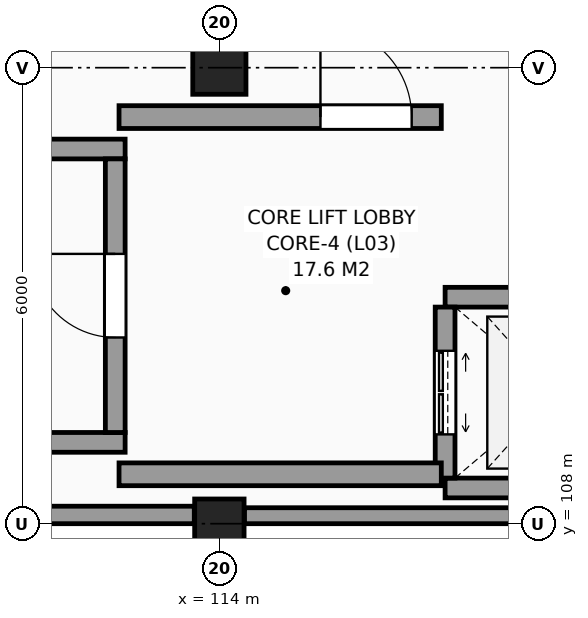
"""IFC4 building model, lengths in metres.
Left out: names, types, materials, properties, quantities, classifications, styles, units other than length and angle.
Written with IfcOpenShell. Run it as: python <this file> out.ifc"""

import sys

from ifc_helpers import new_model, si_unit, direction, frame, frame_2d, origin, origin_2d, place, context, subcontext, project, spatial, rectangle, circle, extrude, element, fill, save


model = new_model("IFC4")
c1 = context("Model", 3, precision=1e-05, world=origin(), true_north=direction((0.0, 1.0)))
c2 = subcontext(c1, "Body", "Model", "MODEL_VIEW")
j1 = project(units=[si_unit("LENGTHUNIT", "METRE"), si_unit("PLANEANGLEUNIT", "RADIAN")], contexts=[c1])
p1 = place(None, origin())
s1 = spatial("IfcSite", under=j1, at=p1, CompositionType="ELEMENT")
p2 = place(p1, origin())
s2 = spatial("IfcBuilding", under=s1, at=p2, CompositionType="ELEMENT")
p3 = place(p2, frame((0.0, 0.0, 15.0)))
s3 = spatial("IfcBuildingStorey", under=s2, at=p3, CompositionType="ELEMENT", Elevation=15.0)
p4 = place(p3, frame((114.0, 108.0, 0.0), z_axis=(0.0, 0.0, 1.0), x_axis=(1.0, 0.0, 0.0)))
e1 = element("IfcColumn", 1, at=p4, inside=s3, PredefinedType="COLUMN", context=c2, shape_type="SweptSolid", body=[
    extrude(rectangle(XDim=0.65, YDim=0.65, at=origin_2d()), origin(), (0.0, 0.0, 1.0), 4.8),
])
p5 = place(p3, frame((114.0, 114.0, 0.0), z_axis=(0.0, 0.0, 1.0), x_axis=(1.0, 0.0, 0.0)))
e2 = element("IfcColumn", 2, at=p5, inside=s3, PredefinedType="COLUMN", context=c2, shape_type="SweptSolid", body=[
    extrude(circle(Radius=0.35, at=origin_2d()), origin(), (0.0, 0.0, 1.0), 4.8),
])
p6 = place(p3, frame((108.355, 108.115, 0.0), z_axis=(0.0, 0.0, 1.0), x_axis=(1.0, 0.0, 0.0)))
e3 = element("IfcWall", 3, at=p6, inside=s3, PredefinedType="SOLIDWALL", context=c2, shape_type="SweptSolid", body=[
    extrude(rectangle(XDim=5.315, YDim=0.23, at=frame_2d((2.657, 0.0))), origin(), (0.0, 0.0, 1.0), 3.7),
])
p7 = place(p3, frame((114.33, 108.105, 0.0), z_axis=(0.0, 0.0, 1.0), x_axis=(1.0, 0.0, 0.0)))
e4 = element("IfcWall", 4, at=p7, inside=s3, PredefinedType="SOLIDWALL", context=c2, shape_type="SweptSolid", body=[
    extrude(rectangle(XDim=5.315, YDim=0.21, at=frame_2d((2.657, 0.0))), origin(), (0.0, 0.0, 1.0), 3.7),
])
for number, where, z_axis, x_axis in (
    (5, (102.04, 109.07, 0.0), (0.0, 0.0, 1.0), (1.0, 0.0, 0.0)),
    (6, (102.04, 112.93, 0.0), (0.0, 0.0, 1.0), (1.0, 0.0, 0.0)),
):
    element("IfcWall", number, at=place(p3, frame(where, z_axis=z_axis, x_axis=x_axis)), inside=s3, PredefinedType="SHEAR", context=c2, shape_type="SweptSolid", body=[
        extrude(rectangle(XDim=10.72, YDim=0.26, at=frame_2d((5.36, 0.0))), origin(), (0.0, 0.0, 1.0), 4.8),
    ])
p8 = place(p3, frame((112.63, 109.2, 0.0), z_axis=(0.0, 0.0, 1.0), x_axis=(0.0, 1.0, 0.0)))
e7 = element("IfcWall", 7, at=p8, inside=s3, PredefinedType="SHEAR", context=c2, shape_type="SweptSolid", body=[
    extrude(rectangle(XDim=3.6, YDim=0.26, at=frame_2d((1.8, 0.0))), origin(), (0.0, 0.0, 1.0), 4.8),
])
p9 = place(p8, frame((1.25, 0.0, 0.0)))
e8 = element("IfcOpeningElement", 8, at=p9, cuts=e7, PredefinedType="OPENING", context=c2, shape_type="SweptSolid", body=[
    extrude(rectangle(XDim=1.1, YDim=2.15, at=frame_2d((0.55, 1.075))), frame((0.0, 0.14, 0.0), z_axis=(0.0, -1.0, 0.0), x_axis=(1.0, 0.0, 0.0)), (0.0, 0.0, 1.0), 0.28),
])
for number, where, z_axis, x_axis in (
    (9, (116.97, 108.47, 0.0), (0.0, 0.0, 1.0), (1.0, 0.0, 0.0)),
    (10, (116.97, 110.98, 0.0), (0.0, 0.0, 1.0), (1.0, 0.0, 0.0)),
):
    element("IfcWall", number, at=place(p3, frame(where, z_axis=z_axis, x_axis=x_axis)), inside=s3, PredefinedType="SHEAR", context=c2, shape_type="SweptSolid", body=[
        extrude(rectangle(XDim=2.91, YDim=0.26, at=frame_2d((1.455, 0.0))), origin(), (0.0, 0.0, 1.0), 4.8),
    ])
p10 = place(p3, frame((116.97, 108.6, 0.0), z_axis=(0.0, 0.0, 1.0), x_axis=(0.0, 1.0, 0.0)))
e11 = element("IfcWall", 11, at=p10, inside=s3, PredefinedType="SHEAR", context=c2, shape_type="SweptSolid", body=[
    extrude(rectangle(XDim=2.25, YDim=0.26, at=frame_2d((1.125, 0.0))), origin(), (0.0, 0.0, 1.0), 4.8),
])
p11 = place(p10, frame((0.575, 0.0, 0.0)))
e12 = element("IfcOpeningElement", 12, at=p11, cuts=e11, PredefinedType="OPENING", context=c2, shape_type="SweptSolid", body=[
    extrude(rectangle(XDim=1.1, YDim=2.2, at=frame_2d((0.55, 1.1))), frame((0.0, 0.14, 0.0), z_axis=(0.0, -1.0, 0.0), x_axis=(1.0, 0.0, 0.0)), (0.0, 0.0, 1.0), 0.28),
])
p12 = place(p3, frame((112.68, 113.35, 0.0), z_axis=(0.0, 0.0, 1.0), x_axis=(1.0, 0.0, 0.0)))
e13 = element("IfcWall", 13, at=p12, inside=s3, PredefinedType="SHEAR", context=c2, shape_type="SweptSolid", body=[
    extrude(rectangle(XDim=4.24, YDim=0.3, at=frame_2d((2.12, 0.0))), origin(), (0.0, 0.0, 1.0), 4.8),
])
p13 = place(p12, frame((2.65, 0.0, 0.0)))
e14 = element("IfcOpeningElement", 14, at=p13, cuts=e13, PredefinedType="OPENING", context=c2, shape_type="SweptSolid", body=[
    extrude(rectangle(XDim=1.2, YDim=2.2, at=frame_2d((0.6, 1.1))), frame((0.0, 0.16, 0.0), z_axis=(0.0, -1.0, 0.0), x_axis=(1.0, 0.0, 0.0)), (0.0, 0.0, 1.0), 0.32),
])
p14 = place(p3, frame((112.68, 108.65, 0.0), z_axis=(0.0, 0.0, 1.0), x_axis=(1.0, 0.0, 0.0)))
e15 = element("IfcWall", 15, at=p14, inside=s3, PredefinedType="SHEAR", context=c2, shape_type="SweptSolid", body=[
    extrude(rectangle(XDim=4.24, YDim=0.3, at=frame_2d((2.12, 0.0))), origin(), (0.0, 0.0, 1.0), 4.8),
])
p15 = place(p9, origin())
e16 = element("IfcDoor", 16, at=p15, inside=s3, OperationType="SINGLE_SWING_RIGHT", PredefinedType="DOOR", context=c2, shape_type="SweptSolid", body=[
    extrude(rectangle(XDim=1.1, YDim=2.15, at=frame_2d((0.55, 1.075))), frame((0.0, 0.025, 0.0), z_axis=(0.0, -1.0, 0.0), x_axis=(1.0, 0.0, 0.0)), (0.0, 0.0, 1.0), 0.05),
])
fill(e8, e16)
p16 = place(p11, origin())
e17 = element("IfcDoor", 17, at=p16, inside=s3, OperationType="DOUBLE_DOOR_SLIDING", PredefinedType="DOOR", context=c2, shape_type="SweptSolid", body=[
    extrude(rectangle(XDim=1.1, YDim=2.2, at=frame_2d((0.55, 1.1))), frame((0.0, 0.025, 0.0), z_axis=(0.0, -1.0, 0.0), x_axis=(1.0, 0.0, 0.0)), (0.0, 0.0, 1.0), 0.05),
])
fill(e12, e17)
p17 = place(p13, origin())
e18 = element("IfcDoor", 18, at=p17, inside=s3, OperationType="SINGLE_SWING_LEFT", PredefinedType="DOOR", context=c2, shape_type="SweptSolid", body=[
    extrude(rectangle(XDim=1.2, YDim=2.2, at=frame_2d((0.6, 1.1))), frame((0.0, 0.025, 0.0), z_axis=(0.0, -1.0, 0.0), x_axis=(1.0, 0.0, 0.0)), (0.0, 0.0, 1.0), 0.05),
])
fill(e14, e18)
save(model, sys.argv[1])
